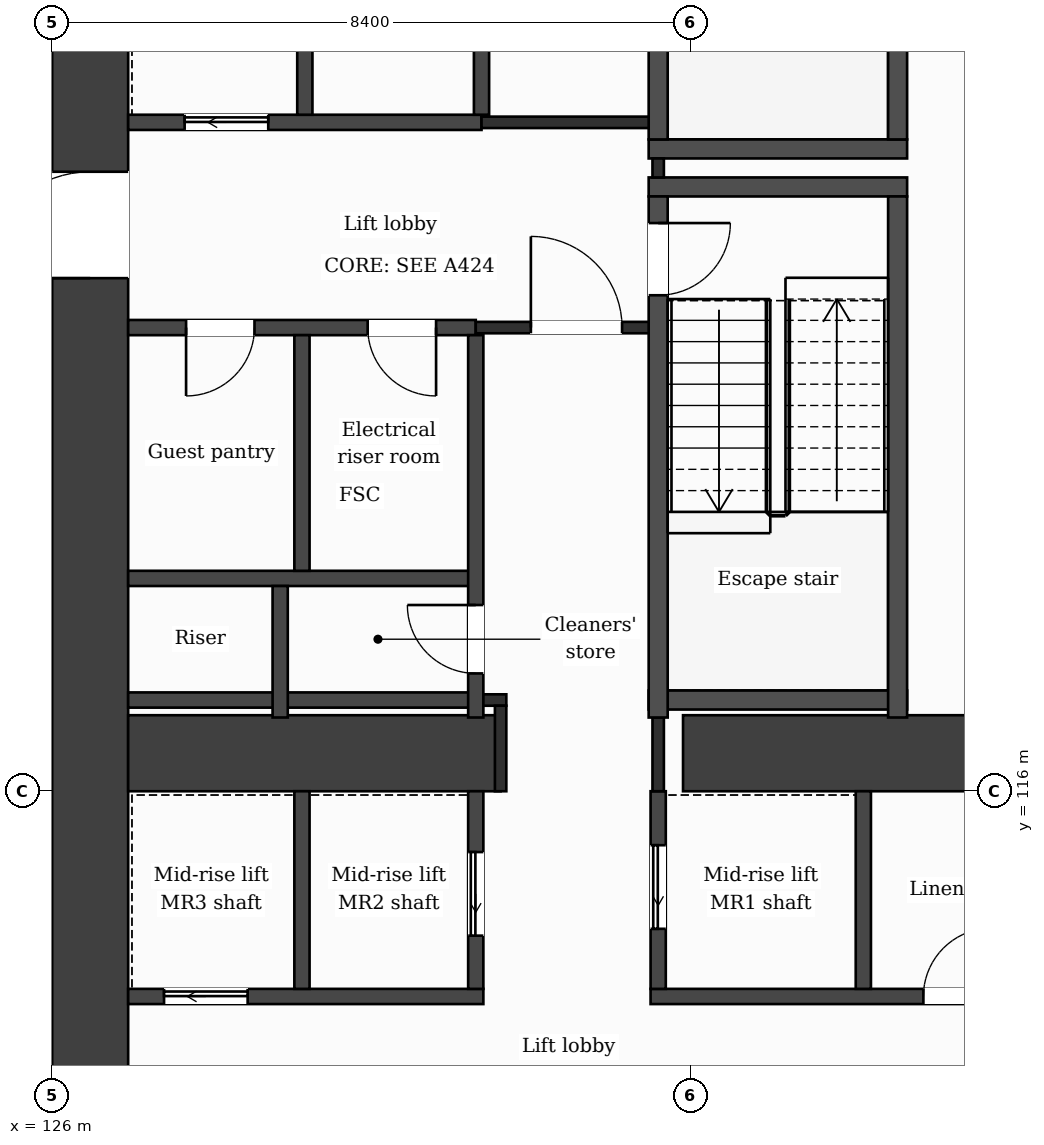
"""IFC4 building model, lengths in metres.
Left out: names, types, materials, properties, quantities, classifications, styles, units other than length and angle.
Written with IfcOpenShell. Run it as: python <this file> out.ifc"""

import sys

from ifc_helpers import new_model, si_unit, direction, frame, frame_2d, origin, place, context, subcontext, project, spatial, rectangle, extrude, element, fill, save


model = new_model("IFC4")
c1 = context("Model", 3, precision=1e-05, world=origin(), true_north=direction((0.0, 1.0)))
c2 = subcontext(c1, "Body", "Model", "MODEL_VIEW")
j1 = project(units=[si_unit("LENGTHUNIT", "METRE"), si_unit("PLANEANGLEUNIT", "RADIAN")], contexts=[c1])
p1 = place(None, origin())
s1 = spatial("IfcSite", under=j1, at=p1, CompositionType="ELEMENT")
p2 = place(p1, origin())
s2 = spatial("IfcBuilding", under=s1, at=p2, CompositionType="ELEMENT")
p3 = place(p2, frame((0.0, 0.0, 102.1)))
s3 = spatial("IfcBuildingStorey", under=s2, at=p3, CompositionType="ELEMENT", Elevation=102.1)
p4 = place(p3, frame((137.732, 131.9, 0.0), z_axis=(0.0, 0.0, 1.0), x_axis=(0.133411141623, -0.991060778808, 0.0)))
e1 = element("IfcWall", 1, at=p4, inside=s3, PredefinedType="SHEAR", context=c2, shape_type="SweptSolid", body=[
    extrude(rectangle(XDim=21.189, YDim=1.0, at=frame_2d((10.595, 0.0))), origin(), (0.0, 0.0, 1.0), 3.7),
])
p5 = place(p3, frame((126.5, 110.9, 0.0), z_axis=(0.0, 0.0, 1.0), x_axis=(0.0, 1.0, 0.0)))
e2 = element("IfcWall", 2, at=p5, inside=s3, PredefinedType="SHEAR", context=c2, shape_type="SweptSolid", body=[
    extrude(rectangle(XDim=21.0, YDim=1.0, at=frame_2d((10.5, 0.0))), origin(), (0.0, 0.0, 1.0), 3.7),
])
p6 = place(p5, frame((11.85, 0.0, 0.0)))
e3 = element("IfcOpeningElement", 3, at=p6, cuts=e2, PredefinedType="OPENING", context=c2, shape_type="SweptSolid", body=[
    extrude(rectangle(XDim=1.4, YDim=2.1, at=frame_2d((0.7, 1.05))), frame((0.0, 0.51, 0.0), z_axis=(0.0, -1.0, 0.0), x_axis=(1.0, 0.0, 0.0)), (0.0, 0.0, 1.0), 1.02),
])
p7 = place(p3, frame((127.0, 116.5, 0.0), z_axis=(0.0, 0.0, 1.0), x_axis=(1.0, 0.0, 0.0)))
e4 = element("IfcWall", 4, at=p7, inside=s3, PredefinedType="SHEAR", context=c2, shape_type="SweptSolid", body=[
    extrude(rectangle(XDim=4.9, YDim=1.0, at=frame_2d((2.45, 0.0))), origin(), (0.0, 0.0, 1.0), 3.7),
])
p8 = place(p3, frame((134.3, 116.5, 0.0), z_axis=(0.0, 0.0, 1.0), x_axis=(1.0, 0.0, 0.0)))
e5 = element("IfcWall", 5, at=p8, inside=s3, PredefinedType="SHEAR", context=c2, shape_type="SweptSolid", body=[
    extrude(rectangle(XDim=5.077, YDim=1.0, at=frame_2d((2.539, 0.0))), origin(), (0.0, 0.0, 1.0), 3.7),
])
p9 = place(p3, frame((127.0, 113.3, 0.0), z_axis=(0.0, 0.0, 1.0), x_axis=(1.0, 0.0, 0.0)))
e6 = element("IfcWall", 6, at=p9, inside=s3, PredefinedType="PARTITIONING", context=c2, shape_type="SweptSolid", body=[
    extrude(rectangle(XDim=4.673, YDim=0.2, at=frame_2d((2.336, 0.0))), origin(), (0.0, 0.0, 1.0), 3.38),
])
p10 = place(p9, frame((0.472, 0.0, 0.0)))
e7 = element("IfcOpeningElement", 7, at=p10, cuts=e6, PredefinedType="OPENING", context=c2, shape_type="SweptSolid", body=[
    extrude(rectangle(XDim=1.1, YDim=2.1, at=frame_2d((0.55, 1.05))), frame((0.0, 0.11, 0.0), z_axis=(0.0, -1.0, 0.0), x_axis=(1.0, 0.0, 0.0)), (0.0, 0.0, 1.0), 0.22),
])
p11 = place(p3, frame((133.873, 113.3, 0.0), z_axis=(0.0, 0.0, 1.0), x_axis=(1.0, 0.0, 0.0)))
e8 = element("IfcWall", 8, at=p11, inside=s3, PredefinedType="PARTITIONING", context=c2, shape_type="SweptSolid", body=[
    extrude(rectangle(XDim=5.888, YDim=0.2, at=frame_2d((2.944, 0.0))), origin(), (0.0, 0.0, 1.0), 3.38),
])
p12 = place(p11, frame((3.589, 0.0, 0.0)))
e9 = element("IfcOpeningElement", 9, at=p12, cuts=e8, PredefinedType="OPENING", context=c2, shape_type="SweptSolid", body=[
    extrude(rectangle(XDim=0.9, YDim=2.1, at=frame_2d((0.45, 1.05))), frame((0.0, 0.11, 0.0), z_axis=(0.0, -1.0, 0.0), x_axis=(1.0, 0.0, 0.0)), (0.0, 0.0, 1.0), 0.22),
])
p13 = place(p3, frame((127.0, 117.2, 0.0), z_axis=(0.0, 0.0, 1.0), x_axis=(1.0, 0.0, 0.0)))
e10 = element("IfcWall", 10, at=p13, inside=s3, PredefinedType="PARTITIONING", context=c2, shape_type="SweptSolid", body=[
    extrude(rectangle(XDim=4.573, YDim=0.2, at=frame_2d((2.287, 0.0))), origin(), (0.0, 0.0, 1.0), 3.38),
])
p14 = place(p3, frame((131.573, 117.2, 0.0), z_axis=(0.0, 0.0, 1.0), x_axis=(1.0, 0.0, 0.0)))
e11 = element("IfcWall", 11, at=p14, inside=s3, PredefinedType="PARTITIONING", context=c2, shape_type="SweptSolid", body=[
    extrude(rectangle(XDim=0.402, YDim=0.15, at=frame_2d((0.201, 0.0))), origin(), (0.0, 0.0, 1.0), 3.38),
])
p15 = place(p3, frame((133.848, 117.2, 0.0), z_axis=(0.0, 0.0, 1.0), x_axis=(1.0, 0.0, 0.0)))
e12 = element("IfcWall", 12, at=p15, inside=s3, PredefinedType="PARTITIONING", context=c2, shape_type="SweptSolid", body=[
    extrude(rectangle(XDim=3.4, YDim=0.25, at=frame_2d((1.7, 0.0))), origin(), (0.0, 0.0, 1.0), 3.38),
])
p16 = place(p3, frame((127.0, 118.8, 0.0), z_axis=(0.0, 0.0, 1.0), x_axis=(1.0, 0.0, 0.0)))
e13 = element("IfcWall", 13, at=p16, inside=s3, PredefinedType="PARTITIONING", context=c2, shape_type="SweptSolid", body=[
    extrude(rectangle(XDim=4.573, YDim=0.2, at=frame_2d((2.287, 0.0))), origin(), (0.0, 0.0, 1.0), 3.38),
])
p17 = place(p3, frame((127.0, 122.1, 0.0), z_axis=(0.0, 0.0, 1.0), x_axis=(1.0, 0.0, 0.0)))
e14 = element("IfcWall", 14, at=p17, inside=s3, PredefinedType="PARTITIONING", context=c2, shape_type="SweptSolid", body=[
    extrude(rectangle(XDim=4.573, YDim=0.2, at=frame_2d((2.287, 0.0))), origin(), (0.0, 0.0, 1.0), 3.38),
])
p18 = place(p17, frame((3.151, 0.0, 0.0)))
e15 = element("IfcOpeningElement", 15, at=p18, cuts=e14, PredefinedType="OPENING", context=c2, shape_type="SweptSolid", body=[
    extrude(rectangle(XDim=0.9, YDim=2.1, at=frame_2d((0.45, 1.05))), frame((0.0, 0.11, 0.0), z_axis=(0.0, -1.0, 0.0), x_axis=(1.0, 0.0, 0.0)), (0.0, 0.0, 1.0), 0.22),
])
p19 = place(p17, frame((0.762, 0.0, 0.0)))
e16 = element("IfcOpeningElement", 16, at=p19, cuts=e14, PredefinedType="OPENING", context=c2, shape_type="SweptSolid", body=[
    extrude(rectangle(XDim=0.9, YDim=2.1, at=frame_2d((0.45, 1.05))), frame((0.0, 0.11, 0.0), z_axis=(0.0, -1.0, 0.0), x_axis=(1.0, 0.0, 0.0)), (0.0, 0.0, 1.0), 0.22),
])
p20 = place(p3, frame((131.573, 122.1, 0.0), z_axis=(0.0, 0.0, 1.0), x_axis=(1.0, 0.0, 0.0)))
e17 = element("IfcWall", 17, at=p20, inside=s3, PredefinedType="PARTITIONING", context=c2, shape_type="SweptSolid", body=[
    extrude(rectangle(XDim=2.4, YDim=0.15, at=frame_2d((1.2, 0.0))), origin(), (0.0, 0.0, 1.0), 3.38),
])
p21 = place(p20, frame((0.725, 0.0, 0.0)))
e18 = element("IfcOpeningElement", 18, at=p21, cuts=e17, PredefinedType="OPENING", context=c2, shape_type="SweptSolid", body=[
    extrude(rectangle(XDim=1.2, YDim=2.1, at=frame_2d((0.6, 1.05))), frame((0.0, 0.085, 0.0), z_axis=(0.0, -1.0, 0.0), x_axis=(1.0, 0.0, 0.0)), (0.0, 0.0, 1.0), 0.17),
])
p22 = place(p3, frame((100.8, 122.45, 0.0), z_axis=(0.0, 0.0, 1.0), x_axis=(1.0, 0.0, 0.0)))
e19 = element("IfcWall", 19, at=p22, inside=s3, PredefinedType="PARTITIONING", context=c2, shape_type="SweptSolid", body=[
    extrude(rectangle(XDim=25.2, YDim=0.15, at=frame_2d((12.6, 0.0))), origin(), (0.0, 0.0, 1.0), 3.38),
])
for number, where, z_axis, x_axis in (
    (20, (133.848, 123.95, 0.0), (0.0, 0.0, 1.0), (1.0, 0.0, 0.0)),
    (21, (133.848, 124.45, 0.0), (0.0, 0.0, 1.0), (1.0, 0.0, 0.0)),
):
    element("IfcWall", number, at=place(p3, frame(where, z_axis=z_axis, x_axis=x_axis)), inside=s3, PredefinedType="PARTITIONING", context=c2, shape_type="SweptSolid", body=[
        extrude(rectangle(XDim=3.4, YDim=0.25, at=frame_2d((1.7, 0.0))), origin(), (0.0, 0.0, 1.0), 3.38),
    ])
p23 = place(p3, frame((100.8, 124.45, 0.0), z_axis=(0.0, 0.0, 1.0), x_axis=(1.0, 0.0, 0.0)))
e22 = element("IfcWall", 22, at=p23, inside=s3, PredefinedType="PARTITIONING", context=c2, shape_type="SweptSolid", body=[
    extrude(rectangle(XDim=25.2, YDim=0.15, at=frame_2d((12.6, 0.0))), origin(), (0.0, 0.0, 1.0), 3.38),
])
p24 = place(p23, frame((1.85, 0.0, 0.0)))
e23 = element("IfcOpeningElement", 23, at=p24, cuts=e22, PredefinedType="OPENING", context=c2, shape_type="SweptSolid", body=[
    extrude(rectangle(XDim=1.0, YDim=2.1, at=frame_2d((0.5, 1.05))), frame((0.0, 0.085, 0.0), z_axis=(0.0, -1.0, 0.0), x_axis=(1.0, 0.0, 0.0)), (0.0, 0.0, 1.0), 0.17),
])
p25 = place(p23, frame((6.425, 0.0, 0.0)))
e24 = element("IfcOpeningElement", 24, at=p25, cuts=e22, PredefinedType="OPENING", context=c2, shape_type="SweptSolid", body=[
    extrude(rectangle(XDim=1.0, YDim=2.1, at=frame_2d((0.5, 1.05))), frame((0.0, 0.085, 0.0), z_axis=(0.0, -1.0, 0.0), x_axis=(1.0, 0.0, 0.0)), (0.0, 0.0, 1.0), 0.17),
])
p26 = place(p23, frame((10.0, 0.0, 0.0)))
e25 = element("IfcOpeningElement", 25, at=p26, cuts=e22, PredefinedType="OPENING", context=c2, shape_type="SweptSolid", body=[
    extrude(rectangle(XDim=1.0, YDim=2.1, at=frame_2d((0.5, 1.05))), frame((0.0, 0.085, 0.0), z_axis=(0.0, -1.0, 0.0), x_axis=(1.0, 0.0, 0.0)), (0.0, 0.0, 1.0), 0.17),
])
p27 = place(p23, frame((14.2, 0.0, 0.0)))
e26 = element("IfcOpeningElement", 26, at=p27, cuts=e22, PredefinedType="OPENING", context=c2, shape_type="SweptSolid", body=[
    extrude(rectangle(XDim=1.0, YDim=2.1, at=frame_2d((0.5, 1.05))), frame((0.0, 0.085, 0.0), z_axis=(0.0, -1.0, 0.0), x_axis=(1.0, 0.0, 0.0)), (0.0, 0.0, 1.0), 0.17),
])
p28 = place(p23, frame((17.8, 0.0, 0.0)))
e27 = element("IfcOpeningElement", 27, at=p28, cuts=e22, PredefinedType="OPENING", context=c2, shape_type="SweptSolid", body=[
    extrude(rectangle(XDim=1.0, YDim=2.1, at=frame_2d((0.5, 1.05))), frame((0.0, 0.085, 0.0), z_axis=(0.0, -1.0, 0.0), x_axis=(1.0, 0.0, 0.0)), (0.0, 0.0, 1.0), 0.17),
])
p29 = place(p23, frame((22.85, 0.0, 0.0)))
e28 = element("IfcOpeningElement", 28, at=p29, cuts=e22, PredefinedType="OPENING", context=c2, shape_type="SweptSolid", body=[
    extrude(rectangle(XDim=1.0, YDim=2.1, at=frame_2d((0.5, 1.05))), frame((0.0, 0.085, 0.0), z_axis=(0.0, -1.0, 0.0), x_axis=(1.0, 0.0, 0.0)), (0.0, 0.0, 1.0), 0.17),
])
p30 = place(p3, frame((127.0, 124.8, 0.0), z_axis=(0.0, 0.0, 1.0), x_axis=(1.0, 0.0, 0.0)))
e29 = element("IfcWall", 29, at=p30, inside=s3, PredefinedType="PARTITIONING", context=c2, shape_type="SweptSolid", body=[
    extrude(rectangle(XDim=4.649, YDim=0.2, at=frame_2d((2.324, 0.0))), origin(), (0.0, 0.0, 1.0), 3.38),
])
p31 = place(p30, frame((0.743, 0.0, 0.0)))
e30 = element("IfcOpeningElement", 30, at=p31, cuts=e29, PredefinedType="OPENING", context=c2, shape_type="SweptSolid", body=[
    extrude(rectangle(XDim=1.1, YDim=2.1, at=frame_2d((0.55, 1.05))), frame((0.0, 0.11, 0.0), z_axis=(0.0, -1.0, 0.0), x_axis=(1.0, 0.0, 0.0)), (0.0, 0.0, 1.0), 0.22),
])
p32 = place(p3, frame((131.649, 124.8, 0.0), z_axis=(0.0, 0.0, 1.0), x_axis=(1.0, 0.0, 0.0)))
e31 = element("IfcWall", 31, at=p32, inside=s3, PredefinedType="PARTITIONING", context=c2, shape_type="SweptSolid", body=[
    extrude(rectangle(XDim=2.449, YDim=0.15, at=frame_2d((1.225, 0.0))), origin(), (0.0, 0.0, 1.0), 3.38),
])
p33 = place(p3, frame((129.0, 116.97, 0.0), z_axis=(0.0, 0.0, 1.0), x_axis=(0.0, 1.0, 0.0)))
e32 = element("IfcWall", 32, at=p33, inside=s3, PredefinedType="PARTITIONING", context=c2, shape_type="SweptSolid", body=[
    extrude(rectangle(XDim=1.73, YDim=0.2, at=frame_2d((0.865, 0.0))), origin(), (0.0, 0.0, 1.0), 3.38),
])
p34 = place(p3, frame((129.287, 113.4, 0.0), z_axis=(0.0, 0.0, 1.0), x_axis=(0.0, 1.0, 0.0)))
e33 = element("IfcWall", 33, at=p34, inside=s3, PredefinedType="PARTITIONING", context=c2, shape_type="SweptSolid", body=[
    extrude(rectangle(XDim=2.6, YDim=0.2, at=frame_2d((1.3, 0.0))), origin(), (0.0, 0.0, 1.0), 3.38),
])
for number, where, z_axis, x_axis in (
    (34, (129.287, 118.9, 0.0), (0.0, 0.0, 1.0), (0.0, 1.0, 0.0)),
    (35, (129.324, 124.9, 0.0), (0.0, 0.0, 1.0), (0.0, 1.0, 0.0)),
):
    element("IfcWall", number, at=place(p3, frame(where, z_axis=z_axis, x_axis=x_axis)), inside=s3, PredefinedType="PARTITIONING", context=c2, shape_type="SweptSolid", body=[
        extrude(rectangle(XDim=3.1, YDim=0.2, at=frame_2d((1.55, 0.0))), origin(), (0.0, 0.0, 1.0), 3.38),
    ])
p35 = place(p3, frame((131.573, 113.4, 0.0), z_axis=(0.0, 0.0, 1.0), x_axis=(0.0, 1.0, 0.0)))
e36 = element("IfcWall", 36, at=p35, inside=s3, PredefinedType="PARTITIONING", context=c2, shape_type="SweptSolid", body=[
    extrude(rectangle(XDim=2.6, YDim=0.2, at=frame_2d((1.3, 0.0))), origin(), (0.0, 0.0, 1.0), 3.38),
])
p36 = place(p35, frame((0.7, 0.0, 0.0)))
e37 = element("IfcOpeningElement", 37, at=p36, cuts=e36, PredefinedType="OPENING", context=c2, shape_type="SweptSolid", body=[
    extrude(rectangle(XDim=1.1, YDim=2.1, at=frame_2d((0.55, 1.05))), frame((0.0, 0.11, 0.0), z_axis=(0.0, -1.0, 0.0), x_axis=(1.0, 0.0, 0.0)), (0.0, 0.0, 1.0), 0.22),
])
p37 = place(p3, frame((131.573, 116.97, 0.0), z_axis=(0.0, 0.0, 1.0), x_axis=(0.0, 1.0, 0.0)))
e38 = element("IfcWall", 38, at=p37, inside=s3, PredefinedType="PARTITIONING", context=c2, shape_type="SweptSolid", body=[
    extrude(rectangle(XDim=5.03, YDim=0.2, at=frame_2d((2.515, 0.0))), origin(), (0.0, 0.0, 1.0), 3.38),
])
p38 = place(p37, frame((0.58, 0.0, 0.0)))
e39 = element("IfcOpeningElement", 39, at=p38, cuts=e38, PredefinedType="OPENING", context=c2, shape_type="SweptSolid", body=[
    extrude(rectangle(XDim=0.9, YDim=2.1, at=frame_2d((0.45, 1.05))), frame((0.0, 0.11, 0.0), z_axis=(0.0, -1.0, 0.0), x_axis=(1.0, 0.0, 0.0)), (0.0, 0.0, 1.0), 0.22),
])
p39 = place(p3, frame((131.649, 124.9, 0.0), z_axis=(0.0, 0.0, 1.0), x_axis=(0.0, 1.0, 0.0)))
e40 = element("IfcWall", 40, at=p39, inside=s3, PredefinedType="PARTITIONING", context=c2, shape_type="SweptSolid", body=[
    extrude(rectangle(XDim=3.1, YDim=0.2, at=frame_2d((1.55, 0.0))), origin(), (0.0, 0.0, 1.0), 3.38),
])
p40 = place(p3, frame((131.9, 116.0, 0.0), z_axis=(0.0, 0.0, 1.0), x_axis=(0.0, 1.0, 0.0)))
e41 = element("IfcWall", 41, at=p40, inside=s3, PredefinedType="PARTITIONING", context=c2, shape_type="SweptSolid", body=[
    extrude(rectangle(XDim=1.125, YDim=0.15, at=frame_2d((0.562, 0.0))), origin(), (0.0, 0.0, 1.0), 3.38),
])
p41 = place(p3, frame((133.973, 113.4, 0.0), z_axis=(0.0, 0.0, 1.0), x_axis=(0.0, 1.0, 0.0)))
e42 = element("IfcWall", 42, at=p41, inside=s3, PredefinedType="PARTITIONING", context=c2, shape_type="SweptSolid", body=[
    extrude(rectangle(XDim=2.6, YDim=0.2, at=frame_2d((1.3, 0.0))), origin(), (0.0, 0.0, 1.0), 3.38),
])
p42 = place(p41, frame((0.79, 0.0, 0.0)))
e43 = element("IfcOpeningElement", 43, at=p42, cuts=e42, PredefinedType="OPENING", context=c2, shape_type="SweptSolid", body=[
    extrude(rectangle(XDim=1.1, YDim=2.1, at=frame_2d((0.55, 1.05))), frame((0.0, 0.11, 0.0), z_axis=(0.0, -1.0, 0.0), x_axis=(1.0, 0.0, 0.0)), (0.0, 0.0, 1.0), 0.22),
])
p43 = place(p3, frame((133.973, 116.0, 0.0), z_axis=(0.0, 0.0, 1.0), x_axis=(0.0, 1.0, 0.0)))
e44 = element("IfcWall", 44, at=p43, inside=s3, PredefinedType="PARTITIONING", context=c2, shape_type="SweptSolid", body=[
    extrude(rectangle(XDim=0.97, YDim=0.15, at=frame_2d((0.485, 0.0))), origin(), (0.0, 0.0, 1.0), 3.38),
])
p44 = place(p3, frame((133.973, 124.075, 0.0), z_axis=(0.0, 0.0, 1.0), x_axis=(0.0, 1.0, 0.0)))
e45 = element("IfcWall", 45, at=p44, inside=s3, PredefinedType="PARTITIONING", context=c2, shape_type="SweptSolid", body=[
    extrude(rectangle(XDim=0.25, YDim=0.15, at=frame_2d((0.125, 0.0))), origin(), (0.0, 0.0, 1.0), 3.38),
])
p45 = place(p3, frame((133.973, 116.97, 0.0), z_axis=(0.0, 0.0, 1.0), x_axis=(0.0, 1.0, 0.0)))
e46 = element("IfcWall", 46, at=p45, inside=s3, PredefinedType="PARTITIONING", context=c2, shape_type="SweptSolid", body=[
    extrude(rectangle(XDim=6.855, YDim=0.25, at=frame_2d((3.427, 0.0))), origin(), (0.0, 0.0, 1.0), 3.38),
])
p46 = place(p45, frame((5.555, 0.0, 0.0)))
e47 = element("IfcOpeningElement", 47, at=p46, cuts=e46, PredefinedType="OPENING", context=c2, shape_type="SweptSolid", body=[
    extrude(rectangle(XDim=0.95, YDim=2.1, at=frame_2d((0.475, 1.05))), frame((0.0, 0.135, 0.0), z_axis=(0.0, -1.0, 0.0), x_axis=(1.0, 0.0, 0.0)), (0.0, 0.0, 1.0), 0.27),
])
p47 = place(p3, frame((133.973, 124.575, 0.0), z_axis=(0.0, 0.0, 1.0), x_axis=(0.0, 1.0, 0.0)))
e48 = element("IfcWall", 48, at=p47, inside=s3, PredefinedType="PARTITIONING", context=c2, shape_type="SweptSolid", body=[
    extrude(rectangle(XDim=6.855, YDim=0.25, at=frame_2d((3.427, 0.0))), origin(), (0.0, 0.0, 1.0), 3.38),
])
p48 = place(p47, frame((5.325, 0.0, 0.0)))
e49 = element("IfcOpeningElement", 49, at=p48, cuts=e48, PredefinedType="OPENING", context=c2, shape_type="SweptSolid", body=[
    extrude(rectangle(XDim=1.0, YDim=2.1, at=frame_2d((0.5, 1.05))), frame((0.0, 0.135, 0.0), z_axis=(0.0, -1.0, 0.0), x_axis=(1.0, 0.0, 0.0)), (0.0, 0.0, 1.0), 0.27),
])
p49 = place(p3, frame((136.672, 113.4, 0.0), z_axis=(0.0, 0.0, 1.0), x_axis=(0.0, 1.0, 0.0)))
e50 = element("IfcWall", 50, at=p49, inside=s3, PredefinedType="PARTITIONING", context=c2, shape_type="SweptSolid", body=[
    extrude(rectangle(XDim=2.6, YDim=0.2, at=frame_2d((1.3, 0.0))), origin(), (0.0, 0.0, 1.0), 3.38),
])
for number, where, z_axis, x_axis in (
    (51, (137.123, 116.97, 0.0), (0.0, 0.0, 1.0), (0.0, 1.0, 0.0)),
    (52, (137.123, 124.575, 0.0), (0.0, 0.0, 1.0), (0.0, 1.0, 0.0)),
):
    element("IfcWall", number, at=place(p3, frame(where, z_axis=z_axis, x_axis=x_axis)), inside=s3, PredefinedType="PARTITIONING", context=c2, shape_type="SweptSolid", body=[
        extrude(rectangle(XDim=6.855, YDim=0.25, at=frame_2d((3.427, 0.0))), origin(), (0.0, 0.0, 1.0), 3.38),
    ])
p50 = place(p21, origin())
e53 = element("IfcDoor", 53, at=p50, inside=s3, OperationType="SINGLE_SWING_LEFT", PredefinedType="DOOR", context=c2, shape_type="SweptSolid", body=[
    extrude(rectangle(XDim=1.2, YDim=2.1, at=frame_2d((0.6, 1.05))), frame((0.0, 0.025, 0.0), z_axis=(0.0, -1.0, 0.0), x_axis=(1.0, 0.0, 0.0)), (0.0, 0.0, 1.0), 0.05),
])
fill(e18, e53)
p51 = place(p31, origin())
e54 = element("IfcDoor", 54, at=p51, inside=s3, OperationType="SLIDING_TO_LEFT", PredefinedType="DOOR", context=c2, shape_type="SweptSolid", body=[
    extrude(rectangle(XDim=1.1, YDim=2.1, at=frame_2d((0.55, 1.05))), frame((0.0, 0.025, 0.0), z_axis=(0.0, -1.0, 0.0), x_axis=(1.0, 0.0, 0.0)), (0.0, 0.0, 1.0), 0.05),
])
fill(e30, e54)
p52 = place(p18, origin())
e55 = element("IfcDoor", 55, at=p52, inside=s3, OperationType="SINGLE_SWING_RIGHT", PredefinedType="DOOR", context=c2, shape_type="SweptSolid", body=[
    extrude(rectangle(XDim=0.9, YDim=2.1, at=frame_2d((0.45, 1.05))), frame((0.0, 0.025, 0.0), z_axis=(0.0, -1.0, 0.0), x_axis=(1.0, 0.0, 0.0)), (0.0, 0.0, 1.0), 0.05),
])
fill(e15, e55)
p53 = place(p19, origin())
e56 = element("IfcDoor", 56, at=p53, inside=s3, OperationType="SINGLE_SWING_LEFT", PredefinedType="DOOR", context=c2, shape_type="SweptSolid", body=[
    extrude(rectangle(XDim=0.9, YDim=2.1, at=frame_2d((0.45, 1.05))), frame((0.0, 0.025, 0.0), z_axis=(0.0, -1.0, 0.0), x_axis=(1.0, 0.0, 0.0)), (0.0, 0.0, 1.0), 0.05),
])
fill(e16, e56)
p54 = place(p46, origin())
e57 = element("IfcDoor", 57, at=p54, inside=s3, OperationType="SINGLE_SWING_RIGHT", PredefinedType="DOOR", context=c2, shape_type="SweptSolid", body=[
    extrude(rectangle(XDim=0.95, YDim=2.1, at=frame_2d((0.475, 1.05))), frame((0.0, 0.025, 0.0), z_axis=(0.0, -1.0, 0.0), x_axis=(1.0, 0.0, 0.0)), (0.0, 0.0, 1.0), 0.05),
])
fill(e47, e57)
p55 = place(p38, origin())
e58 = element("IfcDoor", 58, at=p55, inside=s3, OperationType="SINGLE_SWING_RIGHT", PredefinedType="DOOR", context=c2, shape_type="SweptSolid", body=[
    extrude(rectangle(XDim=0.9, YDim=2.1, at=frame_2d((0.45, 1.05))), frame((0.0, 0.025, 0.0), z_axis=(0.0, -1.0, 0.0), x_axis=(1.0, 0.0, 0.0)), (0.0, 0.0, 1.0), 0.05),
])
fill(e39, e58)
p56 = place(p42, origin())
e59 = element("IfcDoor", 59, at=p56, inside=s3, OperationType="SLIDING_TO_LEFT", PredefinedType="DOOR", context=c2, shape_type="SweptSolid", body=[
    extrude(rectangle(XDim=1.1, YDim=2.1, at=frame_2d((0.55, 1.05))), frame((0.0, 0.025, 0.0), z_axis=(0.0, -1.0, 0.0), x_axis=(1.0, 0.0, 0.0)), (0.0, 0.0, 1.0), 0.05),
])
fill(e43, e59)
p57 = place(p36, origin())
e60 = element("IfcDoor", 60, at=p57, inside=s3, OperationType="SLIDING_TO_LEFT", PredefinedType="DOOR", context=c2, shape_type="SweptSolid", body=[
    extrude(rectangle(XDim=1.1, YDim=2.1, at=frame_2d((0.55, 1.05))), frame((0.0, 0.025, 0.0), z_axis=(0.0, -1.0, 0.0), x_axis=(1.0, 0.0, 0.0)), (0.0, 0.0, 1.0), 0.05),
])
fill(e37, e60)
p58 = place(p10, origin())
e61 = element("IfcDoor", 61, at=p58, inside=s3, OperationType="SLIDING_TO_LEFT", PredefinedType="DOOR", context=c2, shape_type="SweptSolid", body=[
    extrude(rectangle(XDim=1.1, YDim=2.1, at=frame_2d((0.55, 1.05))), frame((0.0, 0.025, 0.0), z_axis=(0.0, -1.0, 0.0), x_axis=(1.0, 0.0, 0.0)), (0.0, 0.0, 1.0), 0.05),
])
fill(e7, e61)
p59 = place(p12, origin())
e62 = element("IfcDoor", 62, at=p59, inside=s3, OperationType="SINGLE_SWING_RIGHT", PredefinedType="DOOR", context=c2, shape_type="SweptSolid", body=[
    extrude(rectangle(XDim=0.9, YDim=2.1, at=frame_2d((0.45, 1.05))), frame((0.0, 0.025, 0.0), z_axis=(0.0, -1.0, 0.0), x_axis=(1.0, 0.0, 0.0)), (0.0, 0.0, 1.0), 0.05),
])
fill(e9, e62)
p60 = place(p6, origin())
e63 = element("IfcDoor", 63, at=p60, inside=s3, OperationType="SINGLE_SWING_LEFT", PredefinedType="DOOR", context=c2, shape_type="SweptSolid", body=[
    extrude(rectangle(XDim=1.4, YDim=2.1, at=frame_2d((0.7, 1.05))), frame((0.0, 0.025, 0.0), z_axis=(0.0, -1.0, 0.0), x_axis=(1.0, 0.0, 0.0)), (0.0, 0.0, 1.0), 0.05),
])
fill(e3, e63)
save(model, sys.argv[1])
